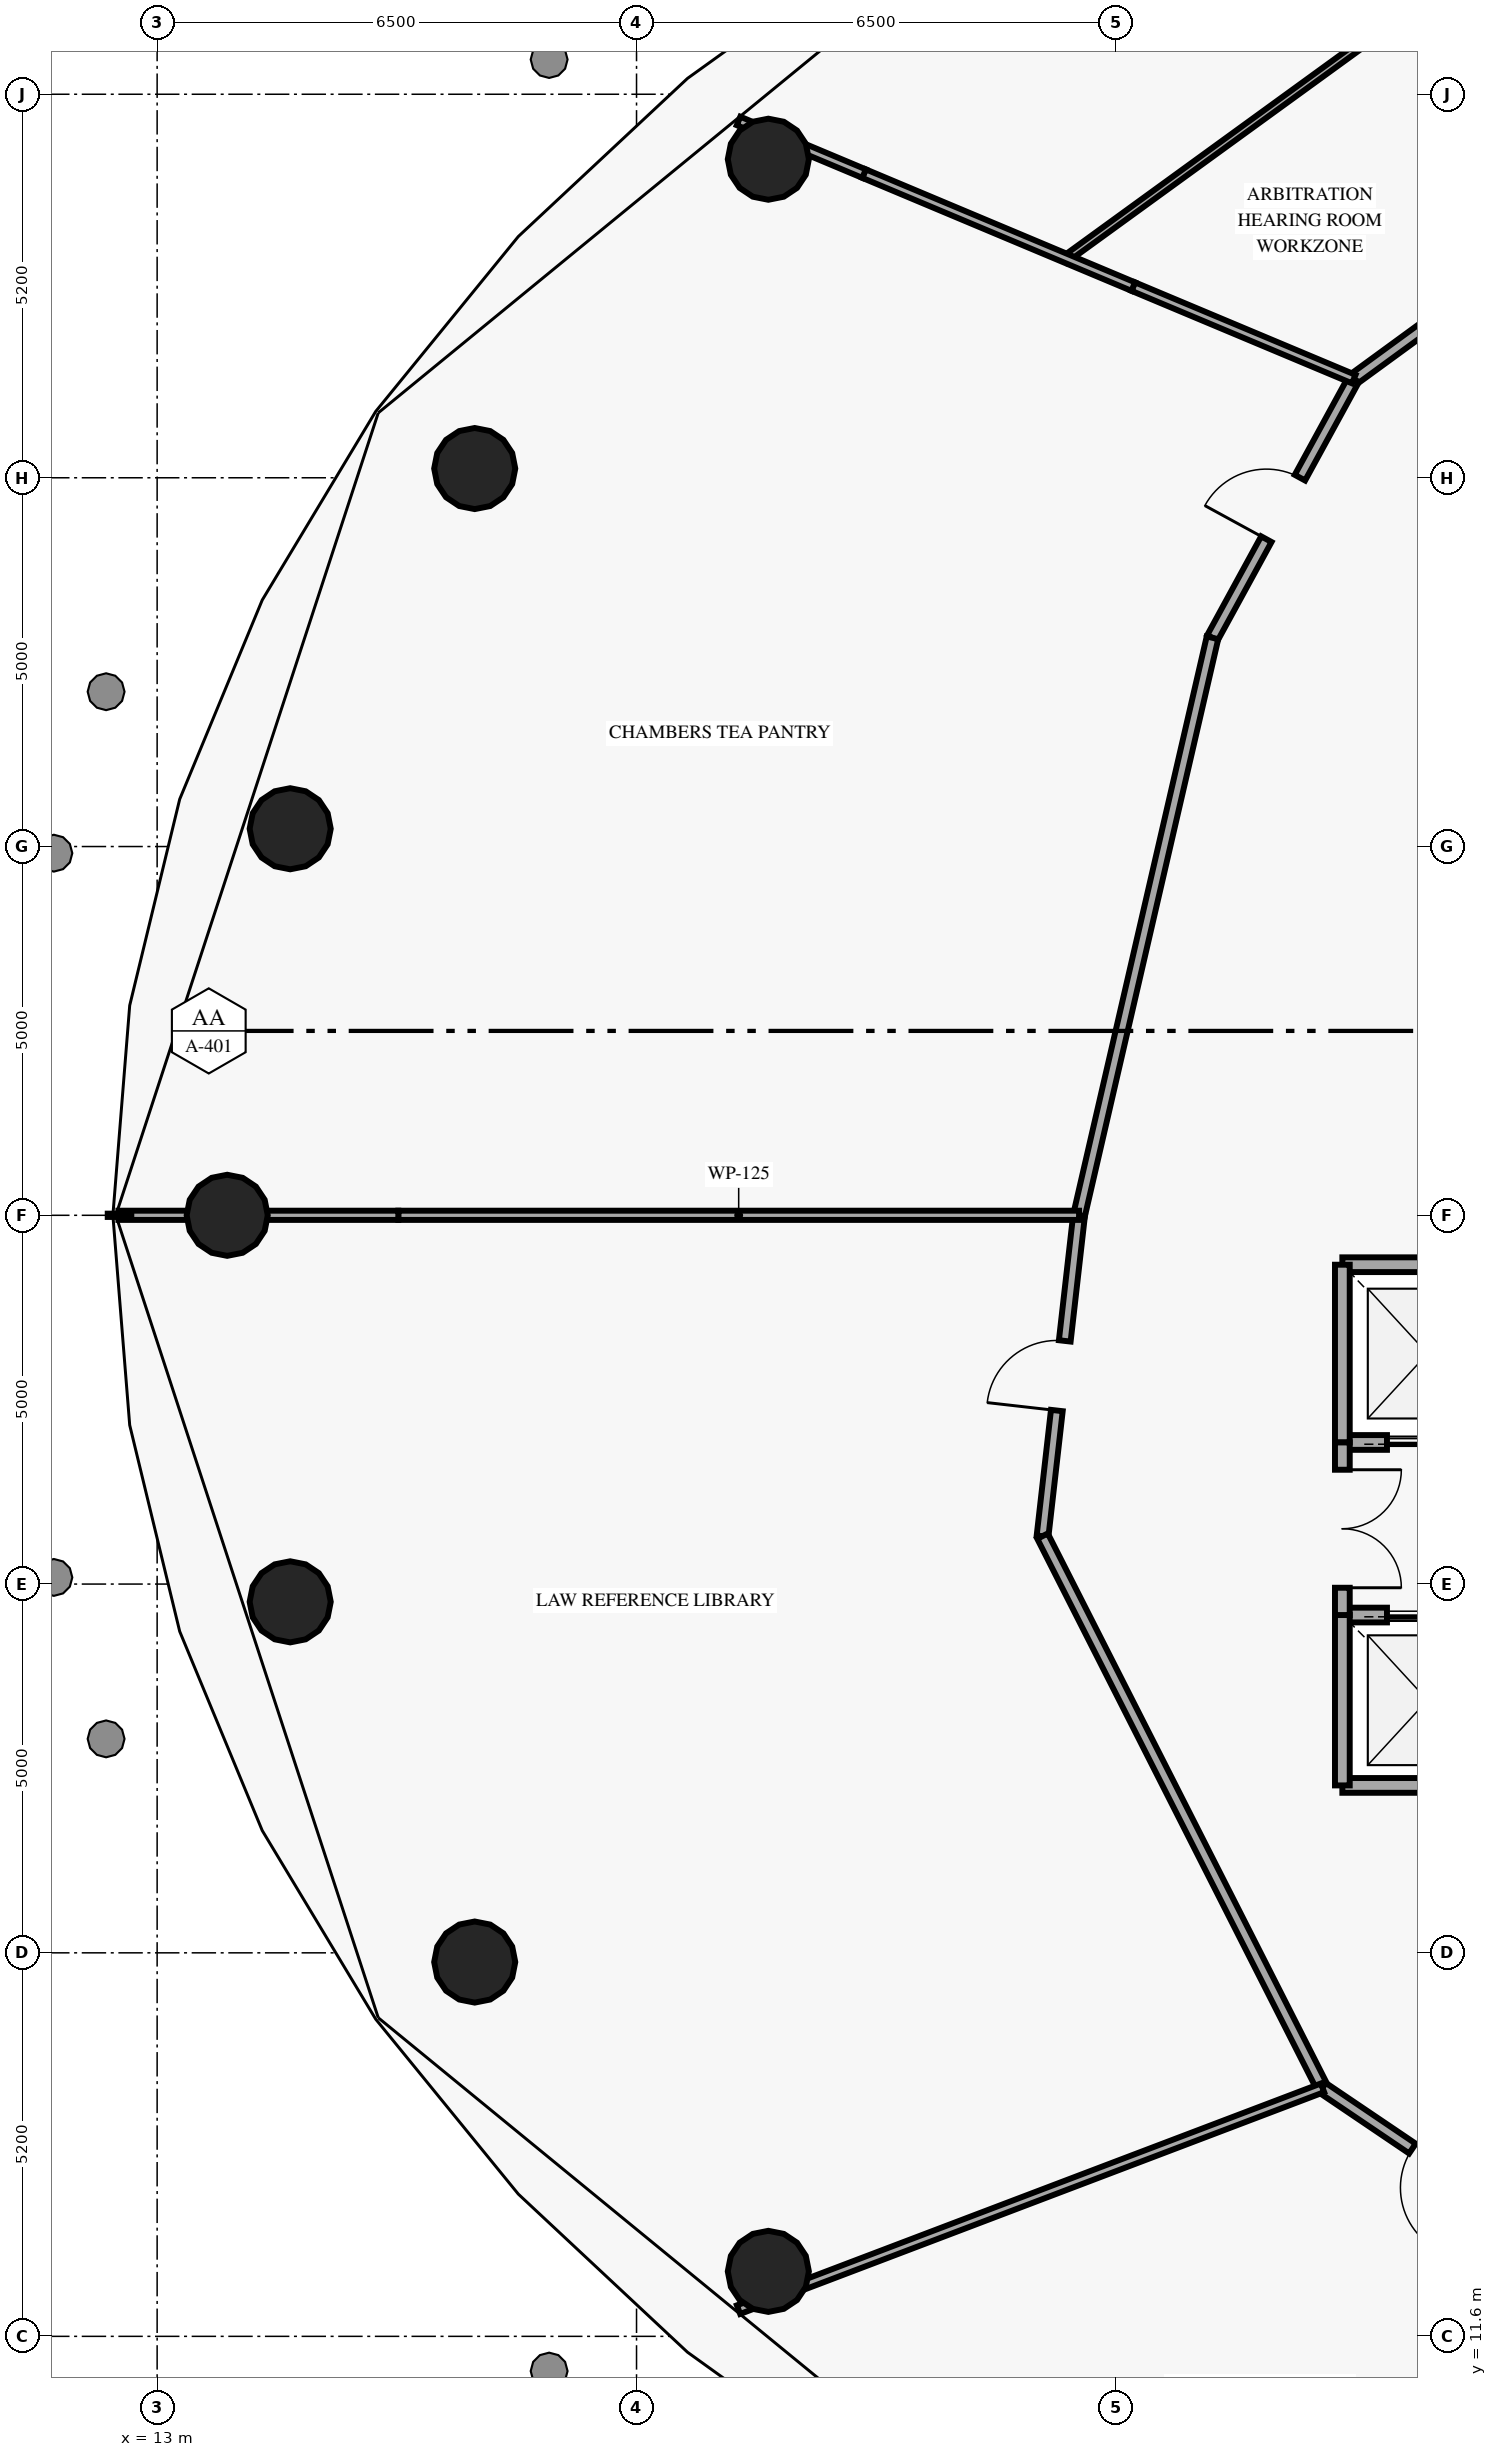
"""IFC4 building model, lengths in metres.
Left out: names, types, materials, properties, quantities, classifications, styles, units other than length and angle.
Written with IfcOpenShell. Run it as: python <this file> out.ifc"""

import sys

from ifc_helpers import new_model, si_unit, direction, frame, frame_2d, origin, origin_2d, place, context, subcontext, project, spatial, rectangle, circle, extrude, element, fill, save


model = new_model("IFC4")
c1 = context("Model", 3, precision=1e-05, world=origin(), true_north=direction((0.0, 1.0)))
c2 = subcontext(c1, "Body", "Model", "MODEL_VIEW")
j1 = project(units=[si_unit("LENGTHUNIT", "METRE"), si_unit("PLANEANGLEUNIT", "RADIAN")], contexts=[c1])
p1 = place(None, origin())
s1 = spatial("IfcSite", under=j1, at=p1, CompositionType="ELEMENT")
p2 = place(p1, origin())
s2 = spatial("IfcBuilding", under=s1, at=p2, CompositionType="ELEMENT")
p3 = place(p2, frame((0.0, 0.0, 53.4)))
s3 = spatial("IfcBuildingStorey", under=s2, at=p3, CompositionType="ELEMENT", Elevation=53.4)
for number, where, z_axis, x_axis in (
    (1, (21.287, 41.119, 0.0), (0.0, 0.0, 1.0), (1.0, 0.0, 0.0)),
    (2, (17.306, 36.925, 0.0), (0.0, 0.0, 1.0), (1.0, 0.0, 0.0)),
    (3, (14.804, 32.041, 0.0), (0.0, 0.0, 1.0), (1.0, 0.0, 0.0)),
    (4, (13.95, 26.8, 0.0), (0.0, 0.0, 1.0), (1.0, 0.0, 0.0)),
    (5, (14.804, 21.559, 0.0), (0.0, 0.0, 1.0), (1.0, 0.0, 0.0)),
    (6, (17.306, 16.675, 0.0), (0.0, 0.0, 1.0), (1.0, 0.0, 0.0)),
    (7, (21.287, 12.481, 0.0), (0.0, 0.0, 1.0), (1.0, 0.0, 0.0)),
):
    element("IfcColumn", number, at=place(p3, frame(where, z_axis=z_axis, x_axis=x_axis)), inside=s3, PredefinedType="COLUMN", context=c2, shape_type="SweptSolid", body=[
        extrude(circle(Radius=0.55, at=origin_2d()), origin(), (0.0, 0.0, 1.0), 3.8),
    ])
p4 = place(p3, frame((29.07, 23.72, 0.0), z_axis=(0.0, 0.0, 1.0), x_axis=(1.0, 0.0, 0.0)))
e8 = element("IfcWall", 8, at=p4, inside=s3, PredefinedType="SOLIDWALL", context=c2, shape_type="SweptSolid", body=[
    extrude(rectangle(XDim=2.31, YDim=0.2, at=frame_2d((1.155, 0.0))), origin(), (0.0, 0.0, 1.0), 3.8),
])
p5 = place(p4, frame((0.605, 0.0, 0.0)))
e9 = element("IfcOpeningElement", 9, at=p5, cuts=e8, PredefinedType="OPENING", context=c2, shape_type="SweptSolid", body=[
    extrude(rectangle(XDim=1.1, YDim=2.15, at=frame_2d((0.55, 1.075))), frame((0.0, 0.11, 0.0), z_axis=(0.0, -1.0, 0.0), x_axis=(1.0, 0.0, 0.0)), (0.0, 0.0, 1.0), 0.22),
])
p6 = place(p3, frame((29.07, 26.13, 0.0), z_axis=(0.0, 0.0, 1.0), x_axis=(1.0, 0.0, 0.0)))
e10 = element("IfcWall", 10, at=p6, inside=s3, PredefinedType="SOLIDWALL", context=c2, shape_type="SweptSolid", body=[
    extrude(rectangle(XDim=2.31, YDim=0.2, at=frame_2d((1.155, 0.0))), origin(), (0.0, 0.0, 1.0), 3.8),
])
p7 = place(p3, frame((29.07, 23.72, 0.0), z_axis=(0.0, 0.0, 1.0), x_axis=(0.0, 1.0, 0.0)))
e11 = element("IfcWall", 11, at=p7, inside=s3, PredefinedType="SOLIDWALL", context=c2, shape_type="SweptSolid", body=[
    extrude(rectangle(XDim=2.41, YDim=0.2, at=frame_2d((1.205, 0.0))), origin(), (0.0, 0.0, 1.0), 3.8),
])
p8 = place(p3, frame((29.07, 19.07, 0.0), z_axis=(0.0, 0.0, 1.0), x_axis=(1.0, 0.0, 0.0)))
e12 = element("IfcWall", 12, at=p8, inside=s3, PredefinedType="SOLIDWALL", context=c2, shape_type="SweptSolid", body=[
    extrude(rectangle(XDim=2.31, YDim=0.2, at=frame_2d((1.155, 0.0))), origin(), (0.0, 0.0, 1.0), 3.8),
])
p9 = place(p3, frame((29.07, 21.38, 0.0), z_axis=(0.0, 0.0, 1.0), x_axis=(1.0, 0.0, 0.0)))
e13 = element("IfcWall", 13, at=p9, inside=s3, PredefinedType="SOLIDWALL", context=c2, shape_type="SweptSolid", body=[
    extrude(rectangle(XDim=2.31, YDim=0.2, at=frame_2d((1.155, 0.0))), origin(), (0.0, 0.0, 1.0), 3.8),
])
p10 = place(p9, frame((0.605, 0.0, 0.0)))
e14 = element("IfcOpeningElement", 14, at=p10, cuts=e13, PredefinedType="OPENING", context=c2, shape_type="SweptSolid", body=[
    extrude(rectangle(XDim=1.1, YDim=2.15, at=frame_2d((0.55, 1.075))), frame((0.0, 0.11, 0.0), z_axis=(0.0, -1.0, 0.0), x_axis=(1.0, 0.0, 0.0)), (0.0, 0.0, 1.0), 0.22),
])
p11 = place(p3, frame((29.07, 19.07, 0.0), z_axis=(0.0, 0.0, 1.0), x_axis=(0.0, 1.0, 0.0)))
e15 = element("IfcWall", 15, at=p11, inside=s3, PredefinedType="SOLIDWALL", context=c2, shape_type="SweptSolid", body=[
    extrude(rectangle(XDim=2.31, YDim=0.2, at=frame_2d((1.155, 0.0))), origin(), (0.0, 0.0, 1.0), 3.8),
])
p12 = place(p3, frame((29.07, 21.38, 0.0), z_axis=(0.0, 0.0, 1.0), x_axis=(0.0, 1.0, 0.0)))
e16 = element("IfcWall", 16, at=p12, inside=s3, PredefinedType="SOLIDWALL", context=c2, shape_type="SweptSolid", body=[
    extrude(rectangle(XDim=2.34, YDim=0.2, at=frame_2d((1.17, 0.0))), origin(), (0.0, 0.0, 1.0), 3.8),
])
p13 = place(p12, frame((0.37, 0.0, 0.0)))
e17 = element("IfcOpeningElement", 17, at=p13, cuts=e16, PredefinedType="OPENING", context=c2, shape_type="SweptSolid", body=[
    extrude(rectangle(XDim=1.6, YDim=2.2, at=frame_2d((0.8, 1.1))), frame((0.0, 0.11, 0.0), z_axis=(0.0, -1.0, 0.0), x_axis=(1.0, 0.0, 0.0)), (0.0, 0.0, 1.0), 0.22),
])
p14 = place(p3, frame((35.348, 42.608, 0.0), z_axis=(0.0, 0.0, 1.0), x_axis=(-0.807666592587, -0.589639445101, 0.0)))
e18 = element("IfcWall", 18, at=p14, inside=s3, PredefinedType="PARTITIONING", context=c2, shape_type="SweptSolid", body=[
    extrude(rectangle(XDim=7.581, YDim=0.16, at=frame_2d((3.791, 0.0))), origin(), (0.0, 0.0, 1.0), 3.8),
])
p15 = place(p3, frame((27.309, 34.63, 0.0), z_axis=(0.0, 0.0, 1.0), x_axis=(0.479339902436, 0.877629339717, 0.0)))
e19 = element("IfcWall", 19, at=p15, inside=s3, PredefinedType="PARTITIONING", context=c2, shape_type="SweptSolid", body=[
    extrude(rectangle(XDim=3.997, YDim=0.16, at=frame_2d((1.999, 0.0))), origin(), (0.0, 0.0, 1.0), 3.8),
])
p16 = place(p15, frame((1.524, 0.0, 0.0)))
e20 = element("IfcOpeningElement", 20, at=p16, cuts=e19, PredefinedType="OPENING", context=c2, shape_type="SweptSolid", body=[
    extrude(rectangle(XDim=0.95, YDim=2.15, at=frame_2d((0.475, 1.075))), frame((0.0, 0.09, 0.0), z_axis=(0.0, -1.0, 0.0), x_axis=(1.0, 0.0, 0.0)), (0.0, 0.0, 1.0), 0.18),
])
p17 = place(p3, frame((27.309, 34.63, 0.0), z_axis=(0.0, 0.0, 1.0), x_axis=(-0.225119097915, -0.974331253606, 0.0)))
e21 = element("IfcWall", 21, at=p17, inside=s3, PredefinedType="PARTITIONING", context=c2, shape_type="SweptSolid", body=[
    extrude(rectangle(XDim=8.036, YDim=0.16, at=frame_2d((4.018, 0.0))), origin(), (0.0, 0.0, 1.0), 3.8),
])
p18 = place(p3, frame((25.005, 22.45, 0.0), z_axis=(0.0, 0.0, 1.0), x_axis=(0.113087354365, 0.993585049345, 0.0)))
e22 = element("IfcWall", 22, at=p18, inside=s3, PredefinedType="PARTITIONING", context=c2, shape_type="SweptSolid", body=[
    extrude(rectangle(XDim=4.378, YDim=0.16, at=frame_2d((2.189, 0.0))), origin(), (0.0, 0.0, 1.0), 3.8),
])
p19 = place(p18, frame((1.714, 0.0, 0.0)))
e23 = element("IfcOpeningElement", 23, at=p19, cuts=e22, PredefinedType="OPENING", context=c2, shape_type="SweptSolid", body=[
    extrude(rectangle(XDim=0.95, YDim=2.15, at=frame_2d((0.475, 1.075))), frame((0.0, 0.09, 0.0), z_axis=(0.0, -1.0, 0.0), x_axis=(1.0, 0.0, 0.0)), (0.0, 0.0, 1.0), 0.18),
])
p20 = place(p3, frame((25.005, 22.45, 0.0), z_axis=(0.0, 0.0, 1.0), x_axis=(0.452560985886, -0.8917334546, 0.0)))
e24 = element("IfcWall", 24, at=p20, inside=s3, PredefinedType="PARTITIONING", context=c2, shape_type="SweptSolid", body=[
    extrude(rectangle(XDim=8.388, YDim=0.16, at=frame_2d((4.194, 0.0))), origin(), (0.0, 0.0, 1.0), 3.8),
])
p21 = place(p3, frame((32.027, 12.79, 0.0), z_axis=(0.0, 0.0, 1.0), x_axis=(-0.828570886609, 0.559884171828, 0.0)))
e25 = element("IfcWall", 25, at=p21, inside=s3, PredefinedType="PARTITIONING", context=c2, shape_type="SweptSolid", body=[
    extrude(rectangle(XDim=3.894, YDim=0.16, at=frame_2d((1.947, 0.0))), origin(), (0.0, 0.0, 1.0), 3.8),
])
p22 = place(p21, frame((1.472, 0.0, 0.0)))
e26 = element("IfcOpeningElement", 26, at=p22, cuts=e25, PredefinedType="OPENING", context=c2, shape_type="SweptSolid", body=[
    extrude(rectangle(XDim=0.95, YDim=2.15, at=frame_2d((0.475, 1.075))), frame((0.0, 0.09, 0.0), z_axis=(0.0, -1.0, 0.0), x_axis=(1.0, 0.0, 0.0)), (0.0, 0.0, 1.0), 0.18),
])
p23 = place(p3, frame((29.317, 42.67, 0.0), z_axis=(0.0, 0.0, 1.0), x_axis=(-0.809304329507, -0.587389565997, 0.0)))
e27 = element("IfcWall", 27, at=p23, inside=s3, PredefinedType="MOVABLE", context=c2, shape_type="SweptSolid", body=[
    extrude(rectangle(XDim=4.957, YDim=0.1, at=frame_2d((2.479, 0.0))), origin(), (0.0, 0.0, 1.0), 3.8),
])
p24 = place(p3, frame((29.225, 38.138, 0.0), z_axis=(0.0, 0.0, 1.0), x_axis=(-0.92216319385, 0.386801039177, 0.0)))
e28 = element("IfcWall", 28, at=p24, inside=s3, PredefinedType="PARTITIONING", context=c2, shape_type="SweptSolid", body=[
    extrude(rectangle(XDim=3.242, YDim=0.125, at=frame_2d((1.621, 0.0))), origin(), (0.0, 0.0, 1.0), 3.8),
])
p25 = place(p3, frame((26.235, 39.392, 0.0), z_axis=(0.0, 0.0, 1.0), x_axis=(-0.922079399294, 0.387000751159, 0.0)))
e29 = element("IfcWall", 29, at=p25, inside=s3, PredefinedType="PARTITIONING", context=c2, shape_type="SweptSolid", body=[
    extrude(rectangle(XDim=3.958, YDim=0.125, at=frame_2d((1.979, 0.0))), origin(), (0.0, 0.0, 1.0), 3.02),
])
p26 = place(p3, frame((22.585, 40.924, 0.0), z_axis=(0.0, 0.0, 1.0), x_axis=(-0.922162419432, 0.386802885443, 0.0)))
e30 = element("IfcWall", 30, at=p26, inside=s3, PredefinedType="PARTITIONING", context=c2, shape_type="SweptSolid", body=[
    extrude(rectangle(XDim=1.845, YDim=0.125, at=frame_2d((0.923, 0.0))), origin(), (0.0, 0.0, 1.0), 3.8),
])
p27 = place(p3, frame((25.5, 26.8, 0.0), z_axis=(0.0, 0.0, 1.0), x_axis=(-1.0, 0.0, 0.0)))
e31 = element("IfcWall", 31, at=p27, inside=s3, PredefinedType="PARTITIONING", context=c2, shape_type="SweptSolid", body=[
    extrude(rectangle(XDim=9.23, YDim=0.125, at=frame_2d((4.615, 0.0))), origin(), (0.0, 0.0, 1.0), 3.8),
])
p28 = place(p3, frame((16.27, 26.8, 0.0), z_axis=(0.0, 0.0, 1.0), x_axis=(-1.0, 0.0, 0.0)))
e32 = element("IfcWall", 32, at=p28, inside=s3, PredefinedType="PARTITIONING", context=c2, shape_type="SweptSolid", body=[
    extrude(rectangle(XDim=2.327, YDim=0.125, at=frame_2d((1.164, 0.0))), origin(), (0.0, 0.0, 1.0), 2.79),
])
p29 = place(p3, frame((13.943, 26.8, 0.0), z_axis=(0.0, 0.0, 1.0), x_axis=(-1.0, 0.0, 0.0)))
e33 = element("IfcWall", 33, at=p29, inside=s3, PredefinedType="PARTITIONING", context=c2, shape_type="SweptSolid", body=[
    extrude(rectangle(XDim=1.468, YDim=0.125, at=frame_2d((0.734, 0.0))), origin(), (0.0, 0.0, 1.0), 3.8),
])
p30 = place(p3, frame((28.801, 14.97, 0.0), z_axis=(0.0, 0.0, 1.0), x_axis=(-0.934813821548, -0.355138168947, 0.0)))
e34 = element("IfcWall", 34, at=p30, inside=s3, PredefinedType="PARTITIONING", context=c2, shape_type="SweptSolid", body=[
    extrude(rectangle(XDim=8.47, YDim=0.125, at=frame_2d((4.235, 0.0))), origin(), (0.0, 0.0, 1.0), 3.8),
])
p31 = place(p5, origin())
e35 = element("IfcDoor", 35, at=p31, inside=s3, OperationType="DOUBLE_DOOR_SLIDING", PredefinedType="DOOR", context=c2, shape_type="SweptSolid", body=[
    extrude(rectangle(XDim=1.1, YDim=2.15, at=frame_2d((0.55, 1.075))), frame((0.0, 0.025, 0.0), z_axis=(0.0, -1.0, 0.0), x_axis=(1.0, 0.0, 0.0)), (0.0, 0.0, 1.0), 0.05),
])
fill(e9, e35)
p32 = place(p10, origin())
e36 = element("IfcDoor", 36, at=p32, inside=s3, OperationType="DOUBLE_DOOR_SLIDING", PredefinedType="DOOR", context=c2, shape_type="SweptSolid", body=[
    extrude(rectangle(XDim=1.1, YDim=2.15, at=frame_2d((0.55, 1.075))), frame((0.0, 0.025, 0.0), z_axis=(0.0, -1.0, 0.0), x_axis=(1.0, 0.0, 0.0)), (0.0, 0.0, 1.0), 0.05),
])
fill(e14, e36)
p33 = place(p13, origin())
e37 = element("IfcDoor", 37, at=p33, inside=s3, OperationType="DOUBLE_DOOR_SINGLE_SWING", PredefinedType="DOOR", context=c2, shape_type="SweptSolid", body=[
    extrude(rectangle(XDim=1.6, YDim=2.2, at=frame_2d((0.8, 1.1))), frame((0.0, 0.025, 0.0), z_axis=(0.0, -1.0, 0.0), x_axis=(1.0, 0.0, 0.0)), (0.0, 0.0, 1.0), 0.05),
])
fill(e17, e37)
p34 = place(p16, origin())
e38 = element("IfcDoor", 38, at=p34, inside=s3, OperationType="SINGLE_SWING_LEFT", PredefinedType="DOOR", context=c2, shape_type="SweptSolid", body=[
    extrude(rectangle(XDim=0.95, YDim=2.15, at=frame_2d((0.475, 1.075))), frame((0.0, 0.025, 0.0), z_axis=(0.0, -1.0, 0.0), x_axis=(1.0, 0.0, 0.0)), (0.0, 0.0, 1.0), 0.05),
])
fill(e20, e38)
p35 = place(p19, origin())
e39 = element("IfcDoor", 39, at=p35, inside=s3, OperationType="SINGLE_SWING_LEFT", PredefinedType="DOOR", context=c2, shape_type="SweptSolid", body=[
    extrude(rectangle(XDim=0.95, YDim=2.15, at=frame_2d((0.475, 1.075))), frame((0.0, 0.025, 0.0), z_axis=(0.0, -1.0, 0.0), x_axis=(1.0, 0.0, 0.0)), (0.0, 0.0, 1.0), 0.05),
])
fill(e23, e39)
p36 = place(p22, origin())
e40 = element("IfcDoor", 40, at=p36, inside=s3, OperationType="SINGLE_SWING_LEFT", PredefinedType="DOOR", context=c2, shape_type="SweptSolid", body=[
    extrude(rectangle(XDim=0.95, YDim=2.15, at=frame_2d((0.475, 1.075))), frame((0.0, 0.025, 0.0), z_axis=(0.0, -1.0, 0.0), x_axis=(1.0, 0.0, 0.0)), (0.0, 0.0, 1.0), 0.05),
])
fill(e26, e40)
save(model, sys.argv[1])
